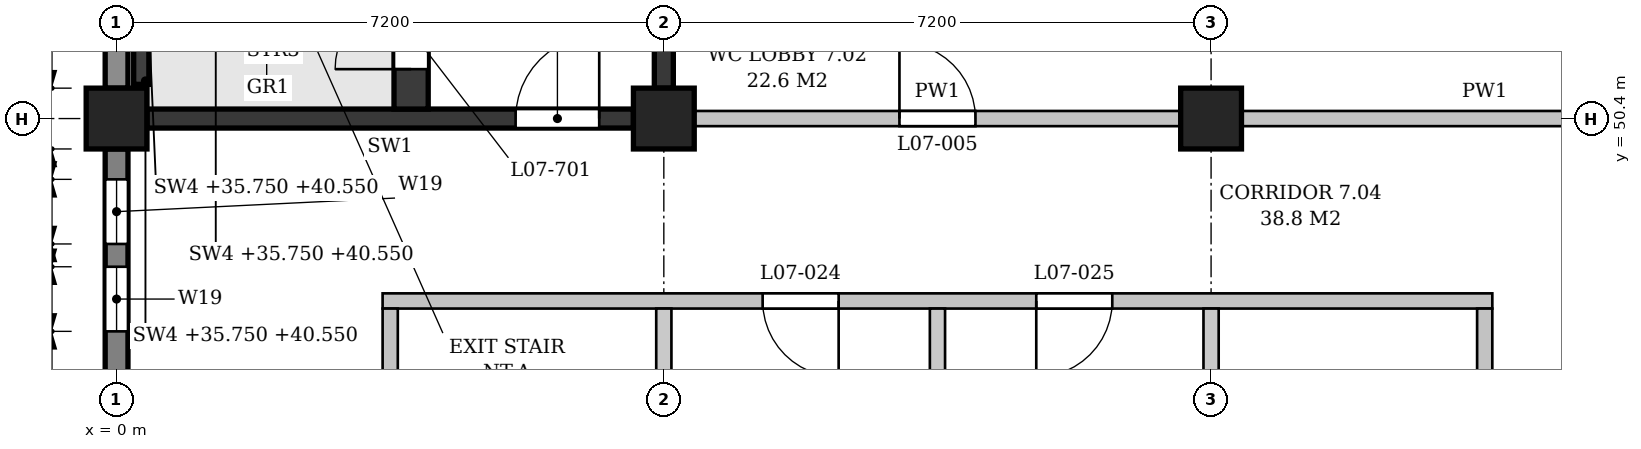
"""IFC4 building model, lengths in metres.
Left out: names, types, materials, properties, quantities, classifications, styles, units other than length and angle.
Written with IfcOpenShell. Run it as: python <this file> out.ifc"""

import sys

from ifc_helpers import new_model, si_unit, direction, frame, frame_2d, origin, origin_2d, place, context, subcontext, project, spatial, polyline, rectangle, outline, extrude, element, fill, save


model = new_model("IFC4")
c1 = context("Model", 3, precision=1e-05, world=origin(), true_north=direction((0.0, 1.0)))
c2 = subcontext(c1, "Body", "Model", "MODEL_VIEW")
j1 = project(units=[si_unit("LENGTHUNIT", "METRE"), si_unit("PLANEANGLEUNIT", "RADIAN")], contexts=[c1])
p1 = place(None, origin())
s1 = spatial("IfcSite", under=j1, at=p1, CompositionType="ELEMENT")
p2 = place(p1, origin())
s2 = spatial("IfcBuilding", under=s1, at=p2, CompositionType="ELEMENT")
p3 = place(p2, frame((0.0, 0.0, 36.0)))
s3 = spatial("IfcBuildingStorey", under=s2, at=p3, CompositionType="ELEMENT", Elevation=36.0)
for number, where, z_axis, x_axis in (
    (1, (0.0, 50.4, 0.0), (0.0, 0.0, 1.0), (1.0, 0.0, 0.0)),
    (2, (7.2, 50.4, 0.0), (0.0, 0.0, 1.0), (1.0, 0.0, 0.0)),
    (3, (14.4, 50.4, 0.0), (0.0, 0.0, 1.0), (1.0, 0.0, 0.0)),
):
    element("IfcColumn", number, at=place(p3, frame(where, z_axis=z_axis, x_axis=x_axis)), inside=s3, PredefinedType="COLUMN", context=c2, shape_type="SweptSolid", body=[
        extrude(rectangle(XDim=0.8, YDim=0.8, at=origin_2d()), origin(), (0.0, 0.0, 1.0), 4.8),
    ])
p4 = place(p3, frame((0.0, 43.6, 0.0), z_axis=(0.0, 0.0, 1.0), x_axis=(0.0, 1.0, 0.0)))
e4 = element("IfcWall", 4, at=p4, inside=s3, PredefinedType="STANDARD", context=c2, shape_type="SweptSolid", body=[
    extrude(rectangle(XDim=6.4, YDim=0.3, at=frame_2d((3.2, 0.0))), origin(), (0.0, 0.0, 1.0), 3.95),
])
p5 = place(p4, frame((0.4, 0.0, 0.9)))
e5 = element("IfcOpeningElement", 5, at=p5, cuts=e4, PredefinedType="OPENING", context=c2, shape_type="SweptSolid", body=[
    extrude(outline(polyline([(0.0, 0.0), (0.85, 0.0), (0.85, 2.55), (0.425, 3.0), (0.0, 2.55), (0.0, 0.0)])), frame((0.0, 0.16, 0.0), z_axis=(0.0, -1.0, 0.0), x_axis=(1.0, 0.0, 0.0)), (0.0, 0.0, 1.0), 0.32),
])
p6 = place(p4, frame((1.55, 0.0, 0.9)))
e6 = element("IfcOpeningElement", 6, at=p6, cuts=e4, PredefinedType="OPENING", context=c2, shape_type="SweptSolid", body=[
    extrude(outline(polyline([(0.0, 0.0), (0.85, 0.0), (0.85, 2.55), (0.425, 3.0), (0.0, 2.55), (0.0, 0.0)])), frame((0.0, 0.16, 0.0), z_axis=(0.0, -1.0, 0.0), x_axis=(1.0, 0.0, 0.0)), (0.0, 0.0, 1.0), 0.32),
])
p7 = place(p4, frame((4.0, 0.0, 0.9)))
e7 = element("IfcOpeningElement", 7, at=p7, cuts=e4, PredefinedType="OPENING", context=c2, shape_type="SweptSolid", body=[
    extrude(outline(polyline([(0.0, 0.0), (0.85, 0.0), (0.85, 2.55), (0.425, 3.0), (0.0, 2.55), (0.0, 0.0)])), frame((0.0, 0.16, 0.0), z_axis=(0.0, -1.0, 0.0), x_axis=(1.0, 0.0, 0.0)), (0.0, 0.0, 1.0), 0.32),
])
p8 = place(p4, frame((5.15, 0.0, 0.9)))
e8 = element("IfcOpeningElement", 8, at=p8, cuts=e4, PredefinedType="OPENING", context=c2, shape_type="SweptSolid", body=[
    extrude(outline(polyline([(0.0, 0.0), (0.85, 0.0), (0.85, 2.55), (0.425, 3.0), (0.0, 2.55), (0.0, 0.0)])), frame((0.0, 0.16, 0.0), z_axis=(0.0, -1.0, 0.0), x_axis=(1.0, 0.0, 0.0)), (0.0, 0.0, 1.0), 0.32),
])
p9 = place(p3, frame((0.0, 50.8, 0.0), z_axis=(0.0, 0.0, 1.0), x_axis=(0.0, 1.0, 0.0)))
e9 = element("IfcWall", 9, at=p9, inside=s3, PredefinedType="STANDARD", context=c2, shape_type="SweptSolid", body=[
    extrude(rectangle(XDim=6.4, YDim=0.3, at=frame_2d((3.2, 0.0))), origin(), (0.0, 0.0, 1.0), 3.95),
])
p10 = place(p9, frame((0.95, 0.0, 0.9)))
e10 = element("IfcOpeningElement", 10, at=p10, cuts=e9, PredefinedType="OPENING", context=c2, shape_type="SweptSolid", body=[
    extrude(outline(polyline([(0.0, 0.0), (0.9, 0.0), (0.9, 2.55), (0.45, 3.0), (0.0, 2.55), (0.0, 0.0)])), frame((0.0, 0.16, 0.0), z_axis=(0.0, -1.0, 0.0), x_axis=(1.0, 0.0, 0.0)), (0.0, 0.0, 1.0), 0.32),
])
p11 = place(p9, frame((4.55, 0.0, 0.9)))
e11 = element("IfcOpeningElement", 11, at=p11, cuts=e9, PredefinedType="OPENING", context=c2, shape_type="SweptSolid", body=[
    extrude(outline(polyline([(0.0, 0.0), (0.9, 0.0), (0.9, 2.55), (0.45, 3.0), (0.0, 2.55), (0.0, 0.0)])), frame((0.0, 0.16, 0.0), z_axis=(0.0, -1.0, 0.0), x_axis=(1.0, 0.0, 0.0)), (0.0, 0.0, 1.0), 0.32),
])
p12 = place(p3, frame((0.4, 50.4, 0.0), z_axis=(0.0, 0.0, 1.0), x_axis=(1.0, 0.0, 0.0)))
e12 = element("IfcWall", 12, at=p12, inside=s3, PredefinedType="SHEAR", context=c2, shape_type="SweptSolid", body=[
    extrude(rectangle(XDim=6.4, YDim=0.25, at=frame_2d((3.2, 0.0))), origin(), (0.0, 0.0, 1.0), 3.85),
])
p13 = place(p12, frame((4.85, 0.0, 0.0)))
e13 = element("IfcOpeningElement", 13, at=p13, cuts=e12, PredefinedType="OPENING", context=c2, shape_type="SweptSolid", body=[
    extrude(rectangle(XDim=1.1, YDim=2.1, at=frame_2d((0.55, 1.05))), frame((0.0, 0.135, 0.0), z_axis=(0.0, -1.0, 0.0), x_axis=(1.0, 0.0, 0.0)), (0.0, 0.0, 1.0), 0.27),
])
p14 = place(p3, frame((7.2, 50.8, 0.0), z_axis=(0.0, 0.0, 1.0), x_axis=(0.0, 1.0, 0.0)))
e14 = element("IfcWall", 14, at=p14, inside=s3, PredefinedType="SHEAR", context=c2, shape_type="SweptSolid", body=[
    extrude(rectangle(XDim=6.4, YDim=0.25, at=frame_2d((3.2, 0.0))), origin(), (0.0, 0.0, 1.0), 3.85),
])
p15 = place(p3, frame((0.325, 50.85, -0.25), z_axis=(0.0, 0.0, 1.0), x_axis=(0.0, 1.0, 0.0)))
e15 = element("IfcWall", 15, at=p15, inside=s3, PredefinedType="SHEAR", context=c2, shape_type="SweptSolid", body=[
    extrude(rectangle(XDim=0.9, YDim=0.2, at=frame_2d((0.45, 0.0))), origin(), (0.0, 0.0, 1.0), 4.8),
])
p16 = place(p3, frame((3.875, 50.525, 0.0), z_axis=(0.0, 0.0, 1.0), x_axis=(0.0, 1.0, 0.0)))
e16 = element("IfcWall", 16, at=p16, inside=s3, PredefinedType="SHEAR", context=c2, shape_type="SweptSolid", body=[
    extrude(rectangle(XDim=6.85, YDim=0.45, at=frame_2d((3.425, 0.0))), origin(), (0.0, 0.0, 1.0), 4.55),
])
p17 = place(p16, frame((0.525, 0.0, 0.0)))
e17 = element("IfcOpeningElement", 17, at=p17, cuts=e16, PredefinedType="OPENING", context=c2, shape_type="SweptSolid", body=[
    extrude(rectangle(XDim=1.0, YDim=2.1, at=frame_2d((0.5, 1.05))), frame((0.0, 0.235, 0.0), z_axis=(0.0, -1.0, 0.0), x_axis=(1.0, 0.0, 0.0)), (0.0, 0.0, 1.0), 0.47),
])
p18 = place(p3, frame((3.5, 48.0, 0.0), z_axis=(0.0, 0.0, 1.0), x_axis=(1.0, 0.0, 0.0)))
e18 = element("IfcWall", 18, at=p18, inside=s3, PredefinedType="PARTITIONING", context=c2, shape_type="SweptSolid", body=[
    extrude(outline(polyline([(0.0, 0.0), (14.6, 0.0), (14.6, 4.55), (11.125, 4.55), (11.125, 3.85), (10.675, 3.85), (10.675, 4.55), (3.925, 4.55), (3.925, 3.85), (3.475, 3.85), (3.475, 4.55), (0.0, 4.55), (0.0, 0.0)])), frame((0.0, 0.1, 0.0), z_axis=(0.0, -1.0, 0.0), x_axis=(1.0, 0.0, 0.0)), (0.0, 0.0, 1.0), 0.2),
])
p19 = place(p18, frame((5.0, 0.0, 0.0)))
e19 = element("IfcOpeningElement", 19, at=p19, cuts=e18, PredefinedType="OPENING", context=c2, shape_type="SweptSolid", body=[
    extrude(rectangle(XDim=1.0, YDim=2.1, at=frame_2d((0.5, 1.05))), frame((0.0, 0.11, 0.0), z_axis=(0.0, -1.0, 0.0), x_axis=(1.0, 0.0, 0.0)), (0.0, 0.0, 1.0), 0.22),
])
p20 = place(p18, frame((8.6, 0.0, 0.0)))
e20 = element("IfcOpeningElement", 20, at=p20, cuts=e18, PredefinedType="OPENING", context=c2, shape_type="SweptSolid", body=[
    extrude(rectangle(XDim=1.0, YDim=2.1, at=frame_2d((0.5, 1.05))), frame((0.0, 0.11, 0.0), z_axis=(0.0, -1.0, 0.0), x_axis=(1.0, 0.0, 0.0)), (0.0, 0.0, 1.0), 0.22),
])
p21 = place(p3, frame((7.6, 50.4, 0.0), z_axis=(0.0, 0.0, 1.0), x_axis=(1.0, 0.0, 0.0)))
e21 = element("IfcWall", 21, at=p21, inside=s3, PredefinedType="PARTITIONING", context=c2, shape_type="SweptSolid", body=[
    extrude(rectangle(XDim=6.4, YDim=0.2, at=frame_2d((3.2, 0.0))), origin(), (0.0, 0.0, 1.0), 3.85),
])
p22 = place(p21, frame((2.7, 0.0, 0.0)))
e22 = element("IfcOpeningElement", 22, at=p22, cuts=e21, PredefinedType="OPENING", context=c2, shape_type="SweptSolid", body=[
    extrude(rectangle(XDim=1.0, YDim=2.1, at=frame_2d((0.5, 1.05))), frame((0.0, 0.11, 0.0), z_axis=(0.0, -1.0, 0.0), x_axis=(1.0, 0.0, 0.0)), (0.0, 0.0, 1.0), 0.22),
])
p23 = place(p3, frame((14.8, 50.4, 0.0), z_axis=(0.0, 0.0, 1.0), x_axis=(1.0, 0.0, 0.0)))
e23 = element("IfcWall", 23, at=p23, inside=s3, PredefinedType="PARTITIONING", context=c2, shape_type="SweptSolid", body=[
    extrude(rectangle(XDim=6.4, YDim=0.2, at=frame_2d((3.2, 0.0))), origin(), (0.0, 0.0, 1.0), 3.85),
])
p24 = place(p23, frame((4.3, 0.0, 0.0)))
e24 = element("IfcOpeningElement", 24, at=p24, cuts=e23, PredefinedType="OPENING", context=c2, shape_type="SweptSolid", body=[
    extrude(rectangle(XDim=1.0, YDim=2.1, at=frame_2d((0.5, 1.05))), frame((0.0, 0.11, 0.0), z_axis=(0.0, -1.0, 0.0), x_axis=(1.0, 0.0, 0.0)), (0.0, 0.0, 1.0), 0.22),
])
p25 = place(p3, frame((3.6, 38.5, 0.0), z_axis=(0.0, 0.0, 1.0), x_axis=(0.0, 1.0, 0.0)))
e25 = element("IfcWall", 25, at=p25, inside=s3, PredefinedType="PARTITIONING", context=c2, shape_type="SweptSolid", body=[
    extrude(outline(polyline([(0.0, 0.0), (9.4, 0.0), (9.4, 4.55), (4.925, 4.55), (4.925, 3.85), (4.475, 3.85), (4.475, 4.55), (0.0, 4.55), (0.0, 0.0)])), frame((0.0, 0.1, 0.0), z_axis=(0.0, -1.0, 0.0), x_axis=(1.0, 0.0, 0.0)), (0.0, 0.0, 1.0), 0.2),
])
p26 = place(p25, frame((4.2, 0.0, 0.0)))
e26 = element("IfcOpeningElement", 26, at=p26, cuts=e25, PredefinedType="OPENING", context=c2, shape_type="SweptSolid", body=[
    extrude(rectangle(XDim=1.0, YDim=2.1, at=frame_2d((0.5, 1.05))), frame((0.0, 0.11, 0.0), z_axis=(0.0, -1.0, 0.0), x_axis=(1.0, 0.0, 0.0)), (0.0, 0.0, 1.0), 0.22),
])
p27 = place(p3, frame((7.2, 43.6, 0.0), z_axis=(0.0, 0.0, 1.0), x_axis=(0.0, 1.0, 0.0)))
e27 = element("IfcWall", 27, at=p27, inside=s3, PredefinedType="PARTITIONING", context=c2, shape_type="SweptSolid", body=[
    extrude(rectangle(XDim=4.3, YDim=0.2, at=frame_2d((2.15, 0.0))), origin(), (0.0, 0.0, 1.0), 3.85),
])
p28 = place(p3, frame((10.8, 38.5, 0.0), z_axis=(0.0, 0.0, 1.0), x_axis=(0.0, 1.0, 0.0)))
e28 = element("IfcWall", 28, at=p28, inside=s3, PredefinedType="PARTITIONING", context=c2, shape_type="SweptSolid", body=[
    extrude(outline(polyline([(0.0, 0.0), (9.4, 0.0), (9.4, 4.55), (4.925, 4.55), (4.925, 3.85), (4.475, 3.85), (4.475, 4.55), (0.0, 4.55), (0.0, 0.0)])), frame((0.0, 0.1, 0.0), z_axis=(0.0, -1.0, 0.0), x_axis=(1.0, 0.0, 0.0)), (0.0, 0.0, 1.0), 0.2),
])
p29 = place(p3, frame((14.4, 43.6, 0.0), z_axis=(0.0, 0.0, 1.0), x_axis=(0.0, 1.0, 0.0)))
e29 = element("IfcWall", 29, at=p29, inside=s3, PredefinedType="PARTITIONING", context=c2, shape_type="SweptSolid", body=[
    extrude(rectangle(XDim=4.3, YDim=0.2, at=frame_2d((2.15, 0.0))), origin(), (0.0, 0.0, 1.0), 3.85),
])
p30 = place(p3, frame((18.0, 38.5, 0.0), z_axis=(0.0, 0.0, 1.0), x_axis=(0.0, 1.0, 0.0)))
e30 = element("IfcWall", 30, at=p30, inside=s3, PredefinedType="PARTITIONING", context=c2, shape_type="SweptSolid", body=[
    extrude(outline(polyline([(0.0, 0.0), (9.4, 0.0), (9.4, 4.55), (4.925, 4.55), (4.925, 3.85), (4.475, 3.85), (4.475, 4.55), (0.0, 4.55), (0.0, 0.0)])), frame((0.0, 0.1, 0.0), z_axis=(0.0, -1.0, 0.0), x_axis=(1.0, 0.0, 0.0)), (0.0, 0.0, 1.0), 0.2),
])
p31 = place(p7, origin())
e31 = element("IfcWindow", 31, at=p31, inside=s3, PartitioningType="SINGLE_PANEL", PredefinedType="WINDOW", context=c2, shape_type="SweptSolid", body=[
    extrude(outline(polyline([(0.0, 0.0), (0.85, 0.0), (0.85, 2.55), (0.425, 3.0), (0.0, 2.55), (0.0, 0.0)])), frame((0.0, 0.03, 0.0), z_axis=(0.0, -1.0, 0.0), x_axis=(1.0, 0.0, 0.0)), (0.0, 0.0, 1.0), 0.06),
])
fill(e7, e31)
p32 = place(p8, origin())
e32 = element("IfcWindow", 32, at=p32, inside=s3, PartitioningType="SINGLE_PANEL", PredefinedType="WINDOW", context=c2, shape_type="SweptSolid", body=[
    extrude(outline(polyline([(0.0, 0.0), (0.85, 0.0), (0.85, 2.55), (0.425, 3.0), (0.0, 2.55), (0.0, 0.0)])), frame((0.0, 0.03, 0.0), z_axis=(0.0, -1.0, 0.0), x_axis=(1.0, 0.0, 0.0)), (0.0, 0.0, 1.0), 0.06),
])
fill(e8, e32)
p33 = place(p17, origin())
e33 = element("IfcDoor", 33, at=p33, inside=s3, OperationType="SINGLE_SWING_LEFT", PredefinedType="DOOR", context=c2, shape_type="SweptSolid", body=[
    extrude(rectangle(XDim=1.0, YDim=2.1, at=frame_2d((0.5, 1.05))), frame((0.0, 0.025, 0.0), z_axis=(0.0, -1.0, 0.0), x_axis=(1.0, 0.0, 0.0)), (0.0, 0.0, 1.0), 0.05),
])
fill(e17, e33)
p34 = place(p13, origin())
e34 = element("IfcDoor", 34, at=p34, inside=s3, OperationType="SINGLE_SWING_RIGHT", PredefinedType="DOOR", context=c2, shape_type="SweptSolid", body=[
    extrude(rectangle(XDim=1.1, YDim=2.1, at=frame_2d((0.55, 1.05))), frame((0.0, 0.025, 0.0), z_axis=(0.0, -1.0, 0.0), x_axis=(1.0, 0.0, 0.0)), (0.0, 0.0, 1.0), 0.05),
])
fill(e13, e34)
p35 = place(p22, origin())
e35 = element("IfcDoor", 35, at=p35, inside=s3, OperationType="SINGLE_SWING_LEFT", PredefinedType="DOOR", context=c2, shape_type="SweptSolid", body=[
    extrude(rectangle(XDim=1.0, YDim=2.1, at=frame_2d((0.5, 1.05))), frame((0.0, 0.025, 0.0), z_axis=(0.0, -1.0, 0.0), x_axis=(1.0, 0.0, 0.0)), (0.0, 0.0, 1.0), 0.05),
])
fill(e22, e35)
p36 = place(p19, frame((1.0, 0.0, 0.0), z_axis=(0.0, 0.0, 1.0), x_axis=(-1.0, 0.0, 0.0)))
e36 = element("IfcDoor", 36, at=p36, inside=s3, OperationType="SINGLE_SWING_LEFT", PredefinedType="DOOR", context=c2, shape_type="SweptSolid", body=[
    extrude(rectangle(XDim=1.0, YDim=2.1, at=frame_2d((0.5, 1.05))), frame((0.0, 0.025, 0.0), z_axis=(0.0, -1.0, 0.0), x_axis=(1.0, 0.0, 0.0)), (0.0, 0.0, 1.0), 0.05),
])
fill(e19, e36)
p37 = place(p20, frame((1.0, 0.0, 0.0), z_axis=(0.0, 0.0, 1.0), x_axis=(-1.0, 0.0, 0.0)))
e37 = element("IfcDoor", 37, at=p37, inside=s3, OperationType="SINGLE_SWING_RIGHT", PredefinedType="DOOR", context=c2, shape_type="SweptSolid", body=[
    extrude(rectangle(XDim=1.0, YDim=2.1, at=frame_2d((0.5, 1.05))), frame((0.0, 0.025, 0.0), z_axis=(0.0, -1.0, 0.0), x_axis=(1.0, 0.0, 0.0)), (0.0, 0.0, 1.0), 0.05),
])
fill(e20, e37)
save(model, sys.argv[1])
